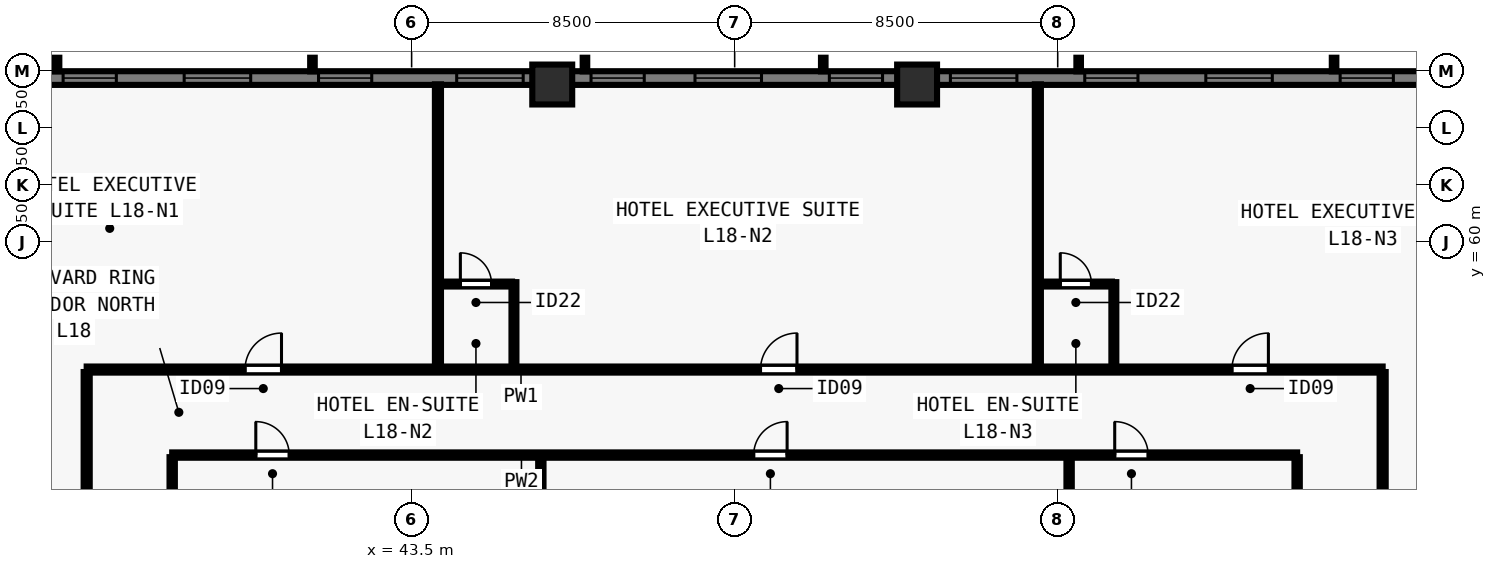
"""IFC4 building model, lengths in metres.
Left out: names, types, materials, properties, quantities, classifications, styles, units other than length and angle.
Written with IfcOpenShell. Run it as: python <this file> out.ifc"""

import sys

from ifc_helpers import new_model, si_unit, direction, frame, frame_2d, origin, origin_2d, place, context, subcontext, project, spatial, rectangle, extrude, element, fill, save


model = new_model("IFC4")
c1 = context("Model", 3, precision=1e-05, world=origin(), true_north=direction((0.0, 1.0)))
c2 = subcontext(c1, "Body", "Model", "MODEL_VIEW")
j1 = project(units=[si_unit("LENGTHUNIT", "METRE"), si_unit("PLANEANGLEUNIT", "RADIAN")], contexts=[c1])
p1 = place(None, origin())
s1 = spatial("IfcSite", under=j1, at=p1, CompositionType="ELEMENT")
p2 = place(p1, origin())
s2 = spatial("IfcBuilding", under=s1, at=p2, CompositionType="ELEMENT")
p3 = place(p2, frame((0.0, 0.0, 69.0)))
s3 = spatial("IfcBuildingStorey", under=s2, at=p3, CompositionType="ELEMENT", Elevation=69.0)
for number, where, z_axis, x_axis in (
    (1, (56.8, 64.15, 0.0), (0.0, 0.0, 1.0), (1.0, 0.0, 0.0)),
    (2, (47.2, 64.15, 0.0), (0.0, 0.0, 1.0), (1.0, 0.0, 0.0)),
):
    element("IfcColumn", number, at=place(p3, frame(where, z_axis=z_axis, x_axis=x_axis)), inside=s3, PredefinedType="COLUMN", context=c2, shape_type="SweptSolid", body=[
        extrude(rectangle(XDim=1.05, YDim=1.05, at=origin_2d()), origin(), (0.0, 0.0, 1.0), 3.5),
    ])
p4 = place(p3, frame((29.5, 64.32, 0.0), z_axis=(0.0, 0.0, 1.0), x_axis=(1.0, 0.0, 0.0)))
e3 = element("IfcWall", 3, at=p4, inside=s3, PredefinedType="SOLIDWALL", context=c2, shape_type="SweptSolid", body=[
    extrude(rectangle(XDim=44.662, YDim=0.36, at=frame_2d((22.331, 0.0))), origin(), (0.0, 0.0, 1.0), 3.28),
])
p5 = place(p4, frame((4.83, 0.0, 0.8)))
e4 = element("IfcOpeningElement", 4, at=p5, cuts=e3, PredefinedType="OPENING", context=c2, shape_type="SweptSolid", body=[
    extrude(rectangle(XDim=1.4, YDim=1.544, at=frame_2d((0.7, 0.772))), frame((0.0, 0.19, 0.0), z_axis=(0.0, -1.0, 0.0), x_axis=(1.0, 0.0, 0.0)), (0.0, 0.0, 1.0), 0.38),
])
p6 = place(p4, frame((8.015, 0.0, 0.8)))
e5 = element("IfcOpeningElement", 5, at=p6, cuts=e3, PredefinedType="OPENING", context=c2, shape_type="SweptSolid", body=[
    extrude(rectangle(XDim=1.75, YDim=1.544, at=frame_2d((0.875, 0.772))), frame((0.0, 0.19, 0.0), z_axis=(0.0, -1.0, 0.0), x_axis=(1.0, 0.0, 0.0)), (0.0, 0.0, 1.0), 0.38),
])
p7 = place(p4, frame((11.551, 0.0, 0.8)))
e6 = element("IfcOpeningElement", 6, at=p7, cuts=e3, PredefinedType="OPENING", context=c2, shape_type="SweptSolid", body=[
    extrude(rectangle(XDim=1.4, YDim=1.544, at=frame_2d((0.7, 0.772))), frame((0.0, 0.19, 0.0), z_axis=(0.0, -1.0, 0.0), x_axis=(1.0, 0.0, 0.0)), (0.0, 0.0, 1.0), 0.38),
])
p8 = place(p4, frame((15.186, 0.0, 0.8)))
e7 = element("IfcOpeningElement", 7, at=p8, cuts=e3, PredefinedType="OPENING", context=c2, shape_type="SweptSolid", body=[
    extrude(rectangle(XDim=1.75, YDim=1.544, at=frame_2d((0.875, 0.772))), frame((0.0, 0.19, 0.0), z_axis=(0.0, -1.0, 0.0), x_axis=(1.0, 0.0, 0.0)), (0.0, 0.0, 1.0), 0.38),
])
p9 = place(p4, frame((18.721, 0.0, 0.8)))
e8 = element("IfcOpeningElement", 8, at=p9, cuts=e3, PredefinedType="OPENING", context=c2, shape_type="SweptSolid", body=[
    extrude(rectangle(XDim=1.4, YDim=1.544, at=frame_2d((0.7, 0.772))), frame((0.0, 0.19, 0.0), z_axis=(0.0, -1.0, 0.0), x_axis=(1.0, 0.0, 0.0)), (0.0, 0.0, 1.0), 0.38),
])
p10 = place(p4, frame((21.456, 0.0, 0.8)))
e9 = element("IfcOpeningElement", 9, at=p10, cuts=e3, PredefinedType="OPENING", context=c2, shape_type="SweptSolid", body=[
    extrude(rectangle(XDim=1.75, YDim=1.544, at=frame_2d((0.875, 0.772))), frame((0.0, 0.19, 0.0), z_axis=(0.0, -1.0, 0.0), x_axis=(1.0, 0.0, 0.0)), (0.0, 0.0, 1.0), 0.38),
])
p11 = place(p4, frame((24.991, 0.0, 0.8)))
e10 = element("IfcOpeningElement", 10, at=p11, cuts=e3, PredefinedType="OPENING", context=c2, shape_type="SweptSolid", body=[
    extrude(rectangle(XDim=1.4, YDim=1.544, at=frame_2d((0.7, 0.772))), frame((0.0, 0.19, 0.0), z_axis=(0.0, -1.0, 0.0), x_axis=(1.0, 0.0, 0.0)), (0.0, 0.0, 1.0), 0.38),
])
p12 = place(p4, frame((28.177, 0.0, 0.8)))
e11 = element("IfcOpeningElement", 11, at=p12, cuts=e3, PredefinedType="OPENING", context=c2, shape_type="SweptSolid", body=[
    extrude(rectangle(XDim=1.75, YDim=1.544, at=frame_2d((0.875, 0.772))), frame((0.0, 0.19, 0.0), z_axis=(0.0, -1.0, 0.0), x_axis=(1.0, 0.0, 0.0)), (0.0, 0.0, 1.0), 0.38),
])
p13 = place(p4, frame((31.711, 0.0, 0.8)))
e12 = element("IfcOpeningElement", 12, at=p13, cuts=e3, PredefinedType="OPENING", context=c2, shape_type="SweptSolid", body=[
    extrude(rectangle(XDim=1.4, YDim=1.544, at=frame_2d((0.7, 0.772))), frame((0.0, 0.19, 0.0), z_axis=(0.0, -1.0, 0.0), x_axis=(1.0, 0.0, 0.0)), (0.0, 0.0, 1.0), 0.38),
])
p14 = place(p4, frame((34.897, 0.0, 0.8)))
e13 = element("IfcOpeningElement", 13, at=p14, cuts=e3, PredefinedType="OPENING", context=c2, shape_type="SweptSolid", body=[
    extrude(rectangle(XDim=1.75, YDim=1.544, at=frame_2d((0.875, 0.772))), frame((0.0, 0.19, 0.0), z_axis=(0.0, -1.0, 0.0), x_axis=(1.0, 0.0, 0.0)), (0.0, 0.0, 1.0), 0.38),
])
p15 = place(p4, frame((38.432, 0.0, 0.8)))
e14 = element("IfcOpeningElement", 14, at=p15, cuts=e3, PredefinedType="OPENING", context=c2, shape_type="SweptSolid", body=[
    extrude(rectangle(XDim=1.4, YDim=1.544, at=frame_2d((0.7, 0.772))), frame((0.0, 0.19, 0.0), z_axis=(0.0, -1.0, 0.0), x_axis=(1.0, 0.0, 0.0)), (0.0, 0.0, 1.0), 0.38),
])
p16 = place(p3, frame((34.95, 56.65, 0.0), z_axis=(0.0, 0.0, 1.0), x_axis=(1.0, 0.0, 0.0)))
e15 = element("IfcWall", 15, at=p16, inside=s3, PredefinedType="PARTITIONING", context=c2, shape_type="SweptSolid", body=[
    extrude(rectangle(XDim=34.1, YDim=0.16, at=frame_2d((17.05, 0.0))), origin(), (0.0, 0.0, 1.0), 3.28),
])
p17 = place(p16, frame((4.166, 0.0, 0.0)))
e16 = element("IfcOpeningElement", 16, at=p17, cuts=e15, PredefinedType="OPENING", context=c2, shape_type="SweptSolid", body=[
    extrude(rectangle(XDim=0.96, YDim=2.15, at=frame_2d((0.48, 1.075))), frame((0.0, 0.09, 0.0), z_axis=(0.0, -1.0, 0.0), x_axis=(1.0, 0.0, 0.0)), (0.0, 0.0, 1.0), 0.18),
])
p18 = place(p16, frame((17.73, 0.0, 0.0)))
e17 = element("IfcOpeningElement", 17, at=p18, cuts=e15, PredefinedType="OPENING", context=c2, shape_type="SweptSolid", body=[
    extrude(rectangle(XDim=0.96, YDim=2.15, at=frame_2d((0.48, 1.075))), frame((0.0, 0.09, 0.0), z_axis=(0.0, -1.0, 0.0), x_axis=(1.0, 0.0, 0.0)), (0.0, 0.0, 1.0), 0.18),
])
p19 = place(p16, frame((30.134, 0.0, 0.0)))
e18 = element("IfcOpeningElement", 18, at=p19, cuts=e15, PredefinedType="OPENING", context=c2, shape_type="SweptSolid", body=[
    extrude(rectangle(XDim=0.96, YDim=2.15, at=frame_2d((0.48, 1.075))), frame((0.0, 0.09, 0.0), z_axis=(0.0, -1.0, 0.0), x_axis=(1.0, 0.0, 0.0)), (0.0, 0.0, 1.0), 0.18),
])
p20 = place(p3, frame((34.95, 21.415, 0.0), z_axis=(0.0, 0.0, 1.0), x_axis=(0.0, 1.0, 0.0)))
e19 = element("IfcWall", 19, at=p20, inside=s3, PredefinedType="PARTITIONING", context=c2, shape_type="SweptSolid", body=[
    extrude(rectangle(XDim=35.17, YDim=0.16, at=frame_2d((17.585, 0.0))), origin(), (0.0, 0.0, 1.0), 3.28),
])
p21 = place(p20, frame((9.414, 0.0, 0.0)))
e20 = element("IfcOpeningElement", 20, at=p21, cuts=e19, PredefinedType="OPENING", context=c2, shape_type="SweptSolid", body=[
    extrude(rectangle(XDim=0.96, YDim=2.15, at=frame_2d((0.48, 1.075))), frame((0.0, 0.09, 0.0), z_axis=(0.0, -1.0, 0.0), x_axis=(1.0, 0.0, 0.0)), (0.0, 0.0, 1.0), 0.18),
])
p22 = place(p20, frame((26.814, 0.0, 0.0)))
e21 = element("IfcOpeningElement", 21, at=p22, cuts=e19, PredefinedType="OPENING", context=c2, shape_type="SweptSolid", body=[
    extrude(rectangle(XDim=0.96, YDim=2.15, at=frame_2d((0.48, 1.075))), frame((0.0, 0.09, 0.0), z_axis=(0.0, -1.0, 0.0), x_axis=(1.0, 0.0, 0.0)), (0.0, 0.0, 1.0), 0.18),
])
p23 = place(p3, frame((69.05, 21.415, 0.0), z_axis=(0.0, 0.0, 1.0), x_axis=(0.0, 1.0, 0.0)))
e22 = element("IfcWall", 22, at=p23, inside=s3, PredefinedType="PARTITIONING", context=c2, shape_type="SweptSolid", body=[
    extrude(rectangle(XDim=35.17, YDim=0.16, at=frame_2d((17.585, 0.0))), origin(), (0.0, 0.0, 1.0), 3.28),
])
p24 = place(p23, frame((9.746, 0.0, 0.0)))
e23 = element("IfcOpeningElement", 23, at=p24, cuts=e22, PredefinedType="OPENING", context=c2, shape_type="SweptSolid", body=[
    extrude(rectangle(XDim=0.96, YDim=2.15, at=frame_2d((0.48, 1.075))), frame((0.0, 0.09, 0.0), z_axis=(0.0, -1.0, 0.0), x_axis=(1.0, 0.0, 0.0)), (0.0, 0.0, 1.0), 0.18),
])
p25 = place(p23, frame((27.146, 0.0, 0.0)))
e24 = element("IfcOpeningElement", 24, at=p25, cuts=e22, PredefinedType="OPENING", context=c2, shape_type="SweptSolid", body=[
    extrude(rectangle(XDim=0.96, YDim=2.15, at=frame_2d((0.48, 1.075))), frame((0.0, 0.09, 0.0), z_axis=(0.0, -1.0, 0.0), x_axis=(1.0, 0.0, 0.0)), (0.0, 0.0, 1.0), 0.18),
])
p26 = place(p3, frame((37.2, 54.4, 0.0), z_axis=(0.0, 0.0, 1.0), x_axis=(1.0, 0.0, 0.0)))
e25 = element("IfcWall", 25, at=p26, inside=s3, PredefinedType="PARTITIONING", context=c2, shape_type="SweptSolid", body=[
    extrude(rectangle(XDim=29.6, YDim=0.14, at=frame_2d((14.8, 0.0))), origin(), (0.0, 0.0, 1.0), 3.28),
])
p27 = place(p26, frame((2.2, 0.0, 0.0)))
e26 = element("IfcOpeningElement", 26, at=p27, cuts=e25, PredefinedType="OPENING", context=c2, shape_type="SweptSolid", body=[
    extrude(rectangle(XDim=0.88, YDim=2.1, at=frame_2d((0.44, 1.05))), frame((0.0, 0.08, 0.0), z_axis=(0.0, -1.0, 0.0), x_axis=(1.0, 0.0, 0.0)), (0.0, 0.0, 1.0), 0.16),
])
p28 = place(p26, frame((15.3, 0.0, 0.0)))
e27 = element("IfcOpeningElement", 27, at=p28, cuts=e25, PredefinedType="OPENING", context=c2, shape_type="SweptSolid", body=[
    extrude(rectangle(XDim=0.88, YDim=2.1, at=frame_2d((0.44, 1.05))), frame((0.0, 0.08, 0.0), z_axis=(0.0, -1.0, 0.0), x_axis=(1.0, 0.0, 0.0)), (0.0, 0.0, 1.0), 0.16),
])
p29 = place(p26, frame((24.8, 0.0, 0.0)))
e28 = element("IfcOpeningElement", 28, at=p29, cuts=e25, PredefinedType="OPENING", context=c2, shape_type="SweptSolid", body=[
    extrude(rectangle(XDim=0.88, YDim=2.1, at=frame_2d((0.44, 1.05))), frame((0.0, 0.08, 0.0), z_axis=(0.0, -1.0, 0.0), x_axis=(1.0, 0.0, 0.0)), (0.0, 0.0, 1.0), 0.16),
])
p30 = place(p3, frame((37.2, 40.8, 0.0), z_axis=(0.0, 0.0, 1.0), x_axis=(0.0, 1.0, 0.0)))
e29 = element("IfcWall", 29, at=p30, inside=s3, PredefinedType="PARTITIONING", context=c2, shape_type="SweptSolid", body=[
    extrude(rectangle(XDim=13.545, YDim=0.14, at=frame_2d((6.772, 0.0))), origin(), (0.0, 0.0, 1.0), 3.28),
])
p31 = place(p30, frame((2.5, 0.0, 0.0)))
e30 = element("IfcOpeningElement", 30, at=p31, cuts=e29, PredefinedType="OPENING", context=c2, shape_type="SweptSolid", body=[
    extrude(rectangle(XDim=0.88, YDim=2.1, at=frame_2d((0.44, 1.05))), frame((0.0, 0.08, 0.0), z_axis=(0.0, -1.0, 0.0), x_axis=(1.0, 0.0, 0.0)), (0.0, 0.0, 1.0), 0.16),
])
p32 = place(p3, frame((66.8, 40.8, 0.0), z_axis=(0.0, 0.0, 1.0), x_axis=(0.0, 1.0, 0.0)))
e31 = element("IfcWall", 31, at=p32, inside=s3, PredefinedType="PARTITIONING", context=c2, shape_type="SweptSolid", body=[
    extrude(rectangle(XDim=13.545, YDim=0.14, at=frame_2d((6.772, 0.0))), origin(), (0.0, 0.0, 1.0), 3.28),
])
p33 = place(p32, frame((2.5, 0.0, 0.0)))
e32 = element("IfcOpeningElement", 32, at=p33, cuts=e31, PredefinedType="OPENING", context=c2, shape_type="SweptSolid", body=[
    extrude(rectangle(XDim=0.88, YDim=2.1, at=frame_2d((0.44, 1.05))), frame((0.0, 0.08, 0.0), z_axis=(0.0, -1.0, 0.0), x_axis=(1.0, 0.0, 0.0)), (0.0, 0.0, 1.0), 0.16),
])
p34 = place(p3, frame((46.9, 47.76, 0.0), z_axis=(0.0, 0.0, 1.0), x_axis=(0.0, 1.0, 0.0)))
e33 = element("IfcWall", 33, at=p34, inside=s3, PredefinedType="PARTITIONING", context=c2, shape_type="SweptSolid", body=[
    extrude(rectangle(XDim=6.585, YDim=0.14, at=frame_2d((3.292, 0.0))), origin(), (0.0, 0.0, 1.0), 3.28),
])
p35 = place(p3, frame((60.8, 47.76, 0.0), z_axis=(0.0, 0.0, 1.0), x_axis=(0.0, 1.0, 0.0)))
e34 = element("IfcWall", 34, at=p35, inside=s3, PredefinedType="PARTITIONING", context=c2, shape_type="SweptSolid", body=[
    extrude(rectangle(XDim=6.585, YDim=0.14, at=frame_2d((3.292, 0.0))), origin(), (0.0, 0.0, 1.0), 2.439),
])
p36 = place(p3, frame((44.192, 56.715, 0.0), z_axis=(0.0, 0.0, 1.0), x_axis=(0.0, 1.0, 0.0)))
e35 = element("IfcWall", 35, at=p36, inside=s3, PredefinedType="PARTITIONING", context=c2, shape_type="SweptSolid", body=[
    extrude(rectangle(XDim=7.44, YDim=0.16, at=frame_2d((3.72, 0.0))), origin(), (0.0, 0.0, 1.0), 3.28),
])
p37 = place(p3, frame((46.192, 56.715, 0.0), z_axis=(0.0, 0.0, 1.0), x_axis=(0.0, 1.0, 0.0)))
e36 = element("IfcWall", 36, at=p37, inside=s3, PredefinedType="PLUMBINGWALL", context=c2, shape_type="SweptSolid", body=[
    extrude(rectangle(XDim=2.235, YDim=0.13, at=frame_2d((1.117, 0.0))), origin(), (0.0, 0.0, 1.0), 3.28),
])
p38 = place(p3, frame((44.258, 58.9, 0.0), z_axis=(0.0, 0.0, 1.0), x_axis=(1.0, 0.0, 0.0)))
e37 = element("IfcWall", 37, at=p38, inside=s3, PredefinedType="PLUMBINGWALL", context=c2, shape_type="SweptSolid", body=[
    extrude(rectangle(XDim=1.885, YDim=0.13, at=frame_2d((0.942, 0.0))), origin(), (0.0, 0.0, 1.0), 3.28),
])
p39 = place(p38, frame((0.525, 0.0, 0.0)))
e38 = element("IfcOpeningElement", 38, at=p39, cuts=e37, PredefinedType="OPENING", context=c2, shape_type="SweptSolid", body=[
    extrude(rectangle(XDim=0.82, YDim=2.1, at=frame_2d((0.41, 1.05))), frame((0.0, 0.075, 0.0), z_axis=(0.0, -1.0, 0.0), x_axis=(1.0, 0.0, 0.0)), (0.0, 0.0, 1.0), 0.15),
])
p40 = place(p3, frame((59.978, 56.715, 0.0), z_axis=(0.0, 0.0, 1.0), x_axis=(0.0, 1.0, 0.0)))
e39 = element("IfcWall", 39, at=p40, inside=s3, PredefinedType="PARTITIONING", context=c2, shape_type="SweptSolid", body=[
    extrude(rectangle(XDim=7.44, YDim=0.16, at=frame_2d((3.72, 0.0))), origin(), (0.0, 0.0, 1.0), 3.28),
])
p41 = place(p3, frame((61.978, 56.715, 0.0), z_axis=(0.0, 0.0, 1.0), x_axis=(0.0, 1.0, 0.0)))
e40 = element("IfcWall", 40, at=p41, inside=s3, PredefinedType="PLUMBINGWALL", context=c2, shape_type="SweptSolid", body=[
    extrude(rectangle(XDim=2.235, YDim=0.13, at=frame_2d((1.117, 0.0))), origin(), (0.0, 0.0, 1.0), 3.28),
])
p42 = place(p3, frame((60.042, 58.9, 0.0), z_axis=(0.0, 0.0, 1.0), x_axis=(1.0, 0.0, 0.0)))
e41 = element("IfcWall", 41, at=p42, inside=s3, PredefinedType="PLUMBINGWALL", context=c2, shape_type="SweptSolid", body=[
    extrude(rectangle(XDim=1.885, YDim=0.13, at=frame_2d((0.942, 0.0))), origin(), (0.0, 0.0, 1.0), 3.28),
])
p43 = place(p42, frame((0.525, 0.0, 0.0)))
e42 = element("IfcOpeningElement", 42, at=p43, cuts=e41, PredefinedType="OPENING", context=c2, shape_type="SweptSolid", body=[
    extrude(rectangle(XDim=0.82, YDim=2.1, at=frame_2d((0.41, 1.05))), frame((0.0, 0.075, 0.0), z_axis=(0.0, -1.0, 0.0), x_axis=(1.0, 0.0, 0.0)), (0.0, 0.0, 1.0), 0.15),
])
p44 = place(p5, origin())
e43 = element("IfcWindow", 43, at=p44, inside=s3, PartitioningType="SINGLE_PANEL", PredefinedType="WINDOW", context=c2, shape_type="SweptSolid", body=[
    extrude(rectangle(XDim=1.4, YDim=1.544, at=frame_2d((0.7, 0.772))), frame((0.0, -0.05, 0.0), z_axis=(0.0, -1.0, 0.0), x_axis=(1.0, 0.0, 0.0)), (0.0, 0.0, 1.0), 0.06),
])
fill(e4, e43)
p45 = place(p6, origin())
e44 = element("IfcWindow", 44, at=p45, inside=s3, PartitioningType="SINGLE_PANEL", PredefinedType="WINDOW", context=c2, shape_type="SweptSolid", body=[
    extrude(rectangle(XDim=1.75, YDim=1.544, at=frame_2d((0.875, 0.772))), frame((0.0, -0.05, 0.0), z_axis=(0.0, -1.0, 0.0), x_axis=(1.0, 0.0, 0.0)), (0.0, 0.0, 1.0), 0.06),
])
fill(e5, e44)
p46 = place(p7, origin())
e45 = element("IfcWindow", 45, at=p46, inside=s3, PartitioningType="SINGLE_PANEL", PredefinedType="WINDOW", context=c2, shape_type="SweptSolid", body=[
    extrude(rectangle(XDim=1.4, YDim=1.544, at=frame_2d((0.7, 0.772))), frame((0.0, -0.05, 0.0), z_axis=(0.0, -1.0, 0.0), x_axis=(1.0, 0.0, 0.0)), (0.0, 0.0, 1.0), 0.06),
])
fill(e6, e45)
p47 = place(p8, origin())
e46 = element("IfcWindow", 46, at=p47, inside=s3, PartitioningType="SINGLE_PANEL", PredefinedType="WINDOW", context=c2, shape_type="SweptSolid", body=[
    extrude(rectangle(XDim=1.75, YDim=1.544, at=frame_2d((0.875, 0.772))), frame((0.0, -0.05, 0.0), z_axis=(0.0, -1.0, 0.0), x_axis=(1.0, 0.0, 0.0)), (0.0, 0.0, 1.0), 0.06),
])
fill(e7, e46)
p48 = place(p9, origin())
e47 = element("IfcWindow", 47, at=p48, inside=s3, PartitioningType="SINGLE_PANEL", PredefinedType="WINDOW", context=c2, shape_type="SweptSolid", body=[
    extrude(rectangle(XDim=1.4, YDim=1.544, at=frame_2d((0.7, 0.772))), frame((0.0, -0.05, 0.0), z_axis=(0.0, -1.0, 0.0), x_axis=(1.0, 0.0, 0.0)), (0.0, 0.0, 1.0), 0.06),
])
fill(e8, e47)
p49 = place(p10, origin())
e48 = element("IfcWindow", 48, at=p49, inside=s3, PartitioningType="SINGLE_PANEL", PredefinedType="WINDOW", context=c2, shape_type="SweptSolid", body=[
    extrude(rectangle(XDim=1.75, YDim=1.544, at=frame_2d((0.875, 0.772))), frame((0.0, -0.05, 0.0), z_axis=(0.0, -1.0, 0.0), x_axis=(1.0, 0.0, 0.0)), (0.0, 0.0, 1.0), 0.06),
])
fill(e9, e48)
p50 = place(p11, origin())
e49 = element("IfcWindow", 49, at=p50, inside=s3, PartitioningType="SINGLE_PANEL", PredefinedType="WINDOW", context=c2, shape_type="SweptSolid", body=[
    extrude(rectangle(XDim=1.4, YDim=1.544, at=frame_2d((0.7, 0.772))), frame((0.0, -0.05, 0.0), z_axis=(0.0, -1.0, 0.0), x_axis=(1.0, 0.0, 0.0)), (0.0, 0.0, 1.0), 0.06),
])
fill(e10, e49)
p51 = place(p12, origin())
e50 = element("IfcWindow", 50, at=p51, inside=s3, PartitioningType="SINGLE_PANEL", PredefinedType="WINDOW", context=c2, shape_type="SweptSolid", body=[
    extrude(rectangle(XDim=1.75, YDim=1.544, at=frame_2d((0.875, 0.772))), frame((0.0, -0.05, 0.0), z_axis=(0.0, -1.0, 0.0), x_axis=(1.0, 0.0, 0.0)), (0.0, 0.0, 1.0), 0.06),
])
fill(e11, e50)
p52 = place(p13, origin())
e51 = element("IfcWindow", 51, at=p52, inside=s3, PartitioningType="SINGLE_PANEL", PredefinedType="WINDOW", context=c2, shape_type="SweptSolid", body=[
    extrude(rectangle(XDim=1.4, YDim=1.544, at=frame_2d((0.7, 0.772))), frame((0.0, -0.05, 0.0), z_axis=(0.0, -1.0, 0.0), x_axis=(1.0, 0.0, 0.0)), (0.0, 0.0, 1.0), 0.06),
])
fill(e12, e51)
p53 = place(p14, origin())
e52 = element("IfcWindow", 52, at=p53, inside=s3, PartitioningType="SINGLE_PANEL", PredefinedType="WINDOW", context=c2, shape_type="SweptSolid", body=[
    extrude(rectangle(XDim=1.75, YDim=1.544, at=frame_2d((0.875, 0.772))), frame((0.0, -0.05, 0.0), z_axis=(0.0, -1.0, 0.0), x_axis=(1.0, 0.0, 0.0)), (0.0, 0.0, 1.0), 0.06),
])
fill(e13, e52)
p54 = place(p15, origin())
e53 = element("IfcWindow", 53, at=p54, inside=s3, PartitioningType="SINGLE_PANEL", PredefinedType="WINDOW", context=c2, shape_type="SweptSolid", body=[
    extrude(rectangle(XDim=1.4, YDim=1.544, at=frame_2d((0.7, 0.772))), frame((0.0, -0.05, 0.0), z_axis=(0.0, -1.0, 0.0), x_axis=(1.0, 0.0, 0.0)), (0.0, 0.0, 1.0), 0.06),
])
fill(e14, e53)
p55 = place(p27, origin())
e54 = element("IfcDoor", 54, at=p55, inside=s3, OperationType="SINGLE_SWING_LEFT", PredefinedType="DOOR", context=c2, shape_type="SweptSolid", body=[
    extrude(rectangle(XDim=0.88, YDim=2.1, at=frame_2d((0.44, 1.05))), frame((0.0, 0.025, 0.0), z_axis=(0.0, -1.0, 0.0), x_axis=(1.0, 0.0, 0.0)), (0.0, 0.0, 1.0), 0.05),
])
fill(e26, e54)
p56 = place(p28, origin())
e55 = element("IfcDoor", 55, at=p56, inside=s3, OperationType="SINGLE_SWING_RIGHT", PredefinedType="DOOR", context=c2, shape_type="SweptSolid", body=[
    extrude(rectangle(XDim=0.88, YDim=2.1, at=frame_2d((0.44, 1.05))), frame((0.0, 0.025, 0.0), z_axis=(0.0, -1.0, 0.0), x_axis=(1.0, 0.0, 0.0)), (0.0, 0.0, 1.0), 0.05),
])
fill(e27, e55)
p57 = place(p29, origin())
e56 = element("IfcDoor", 56, at=p57, inside=s3, OperationType="SINGLE_SWING_LEFT", PredefinedType="DOOR", context=c2, shape_type="SweptSolid", body=[
    extrude(rectangle(XDim=0.88, YDim=2.1, at=frame_2d((0.44, 1.05))), frame((0.0, 0.025, 0.0), z_axis=(0.0, -1.0, 0.0), x_axis=(1.0, 0.0, 0.0)), (0.0, 0.0, 1.0), 0.05),
])
fill(e28, e56)
p58 = place(p17, origin())
e57 = element("IfcDoor", 57, at=p58, inside=s3, OperationType="SINGLE_SWING_RIGHT", PredefinedType="DOOR", context=c2, shape_type="SweptSolid", body=[
    extrude(rectangle(XDim=0.96, YDim=2.15, at=frame_2d((0.48, 1.075))), frame((0.0, 0.025, 0.0), z_axis=(0.0, -1.0, 0.0), x_axis=(1.0, 0.0, 0.0)), (0.0, 0.0, 1.0), 0.05),
])
fill(e16, e57)
p59 = place(p39, origin())
e58 = element("IfcDoor", 58, at=p59, inside=s3, OperationType="SINGLE_SWING_LEFT", PredefinedType="DOOR", context=c2, shape_type="SweptSolid", body=[
    extrude(rectangle(XDim=0.82, YDim=2.1, at=frame_2d((0.41, 1.05))), frame((0.0, 0.025, 0.0), z_axis=(0.0, -1.0, 0.0), x_axis=(1.0, 0.0, 0.0)), (0.0, 0.0, 1.0), 0.05),
])
fill(e38, e58)
p60 = place(p18, origin())
e59 = element("IfcDoor", 59, at=p60, inside=s3, OperationType="SINGLE_SWING_RIGHT", PredefinedType="DOOR", context=c2, shape_type="SweptSolid", body=[
    extrude(rectangle(XDim=0.96, YDim=2.15, at=frame_2d((0.48, 1.075))), frame((0.0, 0.025, 0.0), z_axis=(0.0, -1.0, 0.0), x_axis=(1.0, 0.0, 0.0)), (0.0, 0.0, 1.0), 0.05),
])
fill(e17, e59)
p61 = place(p43, origin())
e60 = element("IfcDoor", 60, at=p61, inside=s3, OperationType="SINGLE_SWING_LEFT", PredefinedType="DOOR", context=c2, shape_type="SweptSolid", body=[
    extrude(rectangle(XDim=0.82, YDim=2.1, at=frame_2d((0.41, 1.05))), frame((0.0, 0.025, 0.0), z_axis=(0.0, -1.0, 0.0), x_axis=(1.0, 0.0, 0.0)), (0.0, 0.0, 1.0), 0.05),
])
fill(e42, e60)
p62 = place(p19, origin())
e61 = element("IfcDoor", 61, at=p62, inside=s3, OperationType="SINGLE_SWING_RIGHT", PredefinedType="DOOR", context=c2, shape_type="SweptSolid", body=[
    extrude(rectangle(XDim=0.96, YDim=2.15, at=frame_2d((0.48, 1.075))), frame((0.0, 0.025, 0.0), z_axis=(0.0, -1.0, 0.0), x_axis=(1.0, 0.0, 0.0)), (0.0, 0.0, 1.0), 0.05),
])
fill(e18, e61)
save(model, sys.argv[1])
